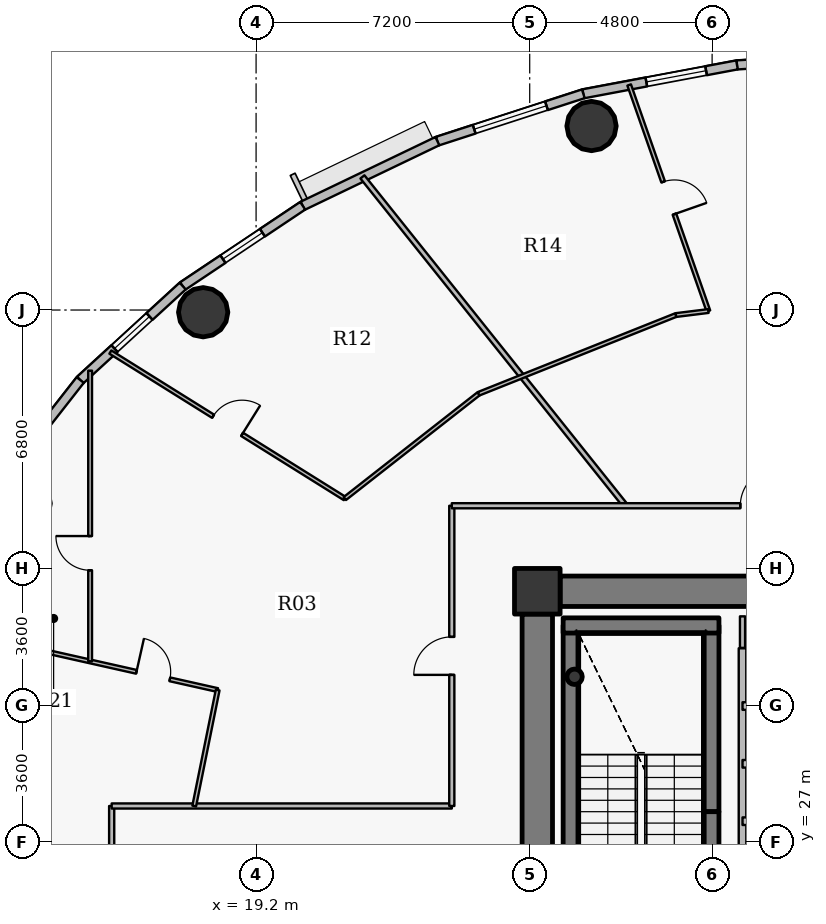
"""IFC4 building model, lengths in metres.
Left out: names, types, materials, properties, quantities, classifications, styles, units other than length and angle.
Written with IfcOpenShell. Run it as: python <this file> out.ifc"""

import sys

from ifc_helpers import new_model, si_unit, direction, frame, frame_2d, origin, origin_2d, place, context, subcontext, project, spatial, rectangle, hollow_circle, extrude, source, transform, mapped, element, fill, save


model = new_model("IFC4")
c1 = context("Model", 3, precision=1e-05, world=origin(), true_north=direction((0.0, 1.0)))
c2 = subcontext(c1, "Body", "Model", "MODEL_VIEW")
j1 = project(units=[si_unit("LENGTHUNIT", "METRE"), si_unit("PLANEANGLEUNIT", "RADIAN")], contexts=[c1])
p1 = place(None, origin())
s1 = spatial("IfcSite", under=j1, at=p1, CompositionType="ELEMENT")
p2 = place(p1, origin())
s2 = spatial("IfcBuilding", under=s1, at=p2, CompositionType="ELEMENT")
p3 = place(p2, frame((0.0, 0.0, 178.65)))
s3 = spatial("IfcBuildingStorey", under=s2, at=p3, CompositionType="ELEMENT", Elevation=178.65)
p4 = place(p3, frame((26.6, 33.6, 0.0), z_axis=(0.0, 0.0, 1.0), x_axis=(1.0, 0.0, 0.0)))
e1 = element("IfcColumn", 1, at=p4, inside=s3, PredefinedType="COLUMN", context=c2, shape_type="SweptSolid", body=[
    extrude(rectangle(XDim=1.2, YDim=1.2, at=origin_2d()), origin(), (0.0, 0.0, 1.0), 3.75),
])
p5 = place(p3, frame((27.48, 24.1, 0.0), z_axis=(0.0, 0.0, 1.0), x_axis=(0.0, 1.0, 0.0)))
e2 = element("IfcWall", 2, at=p5, inside=s3, PredefinedType="SHEAR", context=c2, shape_type="SweptSolid", body=[
    extrude(rectangle(XDim=8.6, YDim=0.4, at=frame_2d((4.3, 0.0))), origin(), (0.0, 0.0, 1.0), 3.75),
])
p6 = place(p3, frame((31.18, 27.8, 0.0), z_axis=(0.0, 0.0, 1.0), x_axis=(0.0, 1.0, 0.0)))
e3 = element("IfcWall", 3, at=p6, inside=s3, PredefinedType="SHEAR", context=c2, shape_type="SweptSolid", body=[
    extrude(rectangle(XDim=4.9, YDim=0.4, at=frame_2d((2.45, 0.0))), origin(), (0.0, 0.0, 1.0), 3.75),
])
p7 = place(p3, frame((27.28, 32.7, 0.0), z_axis=(0.0, 0.0, 1.0), x_axis=(1.0, 0.0, 0.0)))
e4 = element("IfcWall", 4, at=p7, inside=s3, PredefinedType="SHEAR", context=c2, shape_type="SweptSolid", body=[
    extrude(rectangle(XDim=4.1, YDim=0.4, at=frame_2d((2.05, 0.0))), origin(), (0.0, 0.0, 1.0), 3.75),
])
p8 = place(p3, frame((27.58, 31.35, 0.0), z_axis=(0.0, 0.0, 1.0), x_axis=(1.0, 0.0, 0.0)))
e5 = element("IfcColumn", 5, at=p8, inside=s3, PredefinedType="COLUMN", context=c2, shape_type="SweptSolid", body=[
    extrude(hollow_circle(Radius=0.203, WallThickness=0.016, at=origin_2d()), origin(), (0.0, 0.0, 1.0), 3.75),
])
p9 = place(p3, frame((27.2, 33.6, 0.0), z_axis=(0.0, 0.0, 1.0), x_axis=(1.0, 0.0, 0.0)))
e6 = element("IfcWall", 6, at=p9, inside=s3, PredefinedType="SHEAR", context=c2, shape_type="SweptSolid", body=[
    extrude(rectangle(XDim=17.6, YDim=0.8, at=frame_2d((8.8, 0.0))), origin(), (0.0, 0.0, 1.0), 2.95),
])
p10 = place(p9, frame((13.45, 0.0, 0.0)))
e7 = element("IfcOpeningElement", 7, at=p10, cuts=e6, PredefinedType="OPENING", context=c2, shape_type="SweptSolid", body=[
    extrude(rectangle(XDim=1.15, YDim=2.15, at=origin_2d()), frame((0.575, 0.41, 1.075), z_axis=(0.0, -1.0, 0.0), x_axis=(1.0, 0.0, 0.0)), (0.0, 0.0, 1.0), 0.82),
])
p11 = place(p3, frame((26.6, 21.0, 0.0), z_axis=(0.0, 0.0, 1.0), x_axis=(0.0, 1.0, 0.0)))
e8 = element("IfcWall", 8, at=p11, inside=s3, PredefinedType="SHEAR", context=c2, shape_type="SweptSolid", body=[
    extrude(rectangle(XDim=12.0, YDim=0.8, at=frame_2d((6.0, 0.0))), origin(), (0.0, 0.0, 1.0), 2.95),
])
p12 = place(p11, frame((1.061, 0.0, 0.0)))
e9 = element("IfcOpeningElement", 9, at=p12, cuts=e8, PredefinedType="OPENING", context=c2, shape_type="SweptSolid", body=[
    extrude(rectangle(XDim=1.15, YDim=2.15, at=origin_2d()), frame((0.575, 0.41, 1.075), z_axis=(0.0, -1.0, 0.0), x_axis=(1.0, 0.0, 0.0)), (0.0, 0.0, 1.0), 0.82),
])
p13 = place(p3, frame((31.18, 25.55, 0.0), z_axis=(0.0, 0.0, 1.0), x_axis=(0.0, 1.0, 0.0)))
e10 = element("IfcWall", 10, at=p13, inside=s3, PredefinedType="SHEAR", context=c2, shape_type="SweptSolid", body=[
    extrude(rectangle(XDim=2.25, YDim=0.4, at=frame_2d((1.125, 0.0))), origin(), (0.0, 0.0, 1.0), 3.1),
])
for number, where, z_axis, x_axis in (
    (11, (28.027, 45.841, 0.0), (0.0, 0.0, 1.0), (1.0, 0.0, 0.0)),
    (12, (17.808, 40.942, 0.0), (0.0, 0.0, 1.0), (1.0, 0.0, 0.0)),
):
    element("IfcColumn", number, at=place(p3, frame(where, z_axis=z_axis, x_axis=x_axis)), inside=s3, PredefinedType="COLUMN", context=c2, shape_type="SweptSolid", body=[
        extrude(hollow_circle(Radius=0.65, WallThickness=0.04, at=origin_2d()), origin(), (0.0, 0.0, 1.0), 3.75),
    ])
p14 = place(p3, frame((31.854, 47.449, 0.0), z_axis=(0.0, 0.0, 1.0), x_axis=(0.998104600619, 0.061540281305, 0.0)))
e13 = element("IfcWall", 13, at=p14, inside=s3, PredefinedType="SOLIDWALL", context=c2, shape_type="SweptSolid", body=[
    extrude(rectangle(XDim=4.154, YDim=0.24, at=frame_2d((2.077, 0.0))), origin(), (0.0, 0.0, 1.0), 3.5),
])
p15 = place(p14, frame((1.082, 0.0, 0.9)))
e14 = element("IfcOpeningElement", 14, at=p15, cuts=e13, PredefinedType="OPENING", context=c2, shape_type="SweptSolid", body=[
    extrude(rectangle(XDim=2.0, YDim=1.75, at=origin_2d()), frame((1.0, 0.13, 0.875), z_axis=(0.0, -1.0, 0.0), x_axis=(1.0, 0.0, 0.0)), (0.0, 0.0, 1.0), 0.26),
])
p16 = place(p3, frame((27.811, 46.689, 0.0), z_axis=(0.0, 0.0, 1.0), x_axis=(0.982788108205, 0.184736391573, 0.0)))
e15 = element("IfcWall", 15, at=p16, inside=s3, PredefinedType="SOLIDWALL", context=c2, shape_type="SweptSolid", body=[
    extrude(rectangle(XDim=4.114, YDim=0.24, at=frame_2d((2.057, 0.0))), origin(), (0.0, 0.0, 1.0), 3.5),
])
p17 = place(p16, frame((1.687, 0.0, 0.9)))
e16 = element("IfcOpeningElement", 16, at=p17, cuts=e15, PredefinedType="OPENING", context=c2, shape_type="SweptSolid", body=[
    extrude(rectangle(XDim=1.6, YDim=1.75, at=origin_2d()), frame((0.8, 0.13, 0.875), z_axis=(0.0, -1.0, 0.0), x_axis=(1.0, 0.0, 0.0)), (0.0, 0.0, 1.0), 0.26),
])
p18 = place(p3, frame((23.97, 45.444, 0.0), z_axis=(0.0, 0.0, 1.0), x_axis=(0.951209870236, 0.30854462038, 0.0)))
e17 = element("IfcWall", 17, at=p18, inside=s3, PredefinedType="SOLIDWALL", context=c2, shape_type="SweptSolid", body=[
    extrude(rectangle(XDim=4.038, YDim=0.24, at=frame_2d((2.019, 0.0))), origin(), (0.0, 0.0, 1.0), 3.5),
])
p19 = place(p18, frame((1.019, 0.0, 0.9)))
e18 = element("IfcOpeningElement", 18, at=p19, cuts=e17, PredefinedType="OPENING", context=c2, shape_type="SweptSolid", body=[
    extrude(rectangle(XDim=2.0, YDim=1.75, at=origin_2d()), frame((1.0, 0.13, 0.875), z_axis=(0.0, -1.0, 0.0), x_axis=(1.0, 0.0, 0.0)), (0.0, 0.0, 1.0), 0.26),
])
p20 = place(p3, frame((20.427, 43.743, 0.0), z_axis=(0.0, 0.0, 1.0), x_axis=(0.901564733809, 0.432644231155, 0.0)))
e19 = element("IfcWall", 19, at=p20, inside=s3, PredefinedType="SOLIDWALL", context=c2, shape_type="SweptSolid", body=[
    extrude(rectangle(XDim=3.93, YDim=0.24, at=frame_2d((1.965, 0.0))), origin(), (0.0, 0.0, 1.0), 3.5),
])
p21 = place(p3, frame((17.268, 41.631, 0.0), z_axis=(0.0, 0.0, 1.0), x_axis=(0.831228998277, 0.555930168657, 0.0)))
e20 = element("IfcWall", 20, at=p21, inside=s3, PredefinedType="SOLIDWALL", context=c2, shape_type="SweptSolid", body=[
    extrude(rectangle(XDim=3.8, YDim=0.24, at=frame_2d((1.9, 0.0))), origin(), (0.0, 0.0, 1.0), 3.5),
])
p22 = place(p21, frame((1.275, 0.0, 0.9)))
e21 = element("IfcOpeningElement", 21, at=p22, cuts=e20, PredefinedType="OPENING", context=c2, shape_type="SweptSolid", body=[
    extrude(rectangle(XDim=1.25, YDim=1.65, at=origin_2d()), frame((0.625, 0.13, 0.825), z_axis=(0.0, -1.0, 0.0), x_axis=(1.0, 0.0, 0.0)), (0.0, 0.0, 1.0), 0.26),
])
p23 = place(p3, frame((14.572, 39.158, 0.0), z_axis=(0.0, 0.0, 1.0), x_axis=(0.737076565834, 0.675809245349, 0.0)))
e22 = element("IfcWall", 22, at=p23, inside=s3, PredefinedType="SOLIDWALL", context=c2, shape_type="SweptSolid", body=[
    extrude(rectangle(XDim=3.658, YDim=0.24, at=frame_2d((1.829, 0.0))), origin(), (0.0, 0.0, 1.0), 3.5),
])
p24 = place(p23, frame((1.224, 0.0, 0.9)))
e23 = element("IfcOpeningElement", 23, at=p24, cuts=e22, PredefinedType="OPENING", context=c2, shape_type="SweptSolid", body=[
    extrude(rectangle(XDim=1.25, YDim=1.65, at=origin_2d()), frame((0.625, 0.13, 0.825), z_axis=(0.0, -1.0, 0.0), x_axis=(1.0, 0.0, 0.0)), (0.0, 0.0, 1.0), 0.26),
])
p25 = place(p3, frame((12.404, 36.388, 0.0), z_axis=(0.0, 0.0, 1.0), x_axis=(0.616287674549, 0.787521112224, 0.0)))
e24 = element("IfcWall", 24, at=p25, inside=s3, PredefinedType="SOLIDWALL", context=c2, shape_type="SweptSolid", body=[
    extrude(rectangle(XDim=3.517, YDim=0.24, at=frame_2d((1.759, 0.0))), origin(), (0.0, 0.0, 1.0), 3.5),
])
p26 = place(p3, frame((10.602, 32.704, 0.0), z_axis=(0.0, 0.0, 1.0), x_axis=(0.9756977614, -0.21912069368, 0.0)))
e25 = element("IfcWall", 25, at=p26, inside=s3, PredefinedType="PARTITIONING", context=c2, shape_type="SweptSolid", body=[
    extrude(rectangle(XDim=7.776, YDim=0.1, at=frame_2d((3.888, 0.0))), origin(), (0.0, 0.0, 1.0), 2.935),
])
p27 = place(p26, frame((5.586, 0.0, 0.0)))
e26 = element("IfcOpeningElement", 26, at=p27, cuts=e25, PredefinedType="OPENING", context=c2, shape_type="SweptSolid", body=[
    extrude(rectangle(XDim=0.9, YDim=2.1, at=origin_2d()), frame((0.45, 0.06, 1.05), z_axis=(0.0, -1.0, 0.0), x_axis=(1.0, 0.0, 0.0)), (0.0, 0.0, 1.0), 0.12),
])
p28 = place(p3, frame((14.833, 31.754, 0.0), z_axis=(0.0, 0.0, 1.0), x_axis=(0.0, 1.0, 0.0)))
e27 = element("IfcWall", 27, at=p28, inside=s3, PredefinedType="PARTITIONING", context=c2, shape_type="SweptSolid", body=[
    extrude(rectangle(XDim=7.651, YDim=0.1, at=frame_2d((3.825, 0.0))), origin(), (0.0, 0.0, 1.0), 2.935),
])
p29 = place(p28, frame((2.399, 0.0, 0.0)))
e28 = element("IfcOpeningElement", 28, at=p29, cuts=e27, PredefinedType="OPENING", context=c2, shape_type="SweptSolid", body=[
    extrude(rectangle(XDim=0.9, YDim=2.1, at=origin_2d()), frame((0.45, 0.06, 1.05), z_axis=(0.0, -1.0, 0.0), x_axis=(1.0, 0.0, 0.0)), (0.0, 0.0, 1.0), 0.12),
])
p30 = place(p3, frame((15.366, 39.894, 0.0), z_axis=(0.0, 0.0, 1.0), x_axis=(0.84804732756, -0.529920494242, 0.0)))
e29 = element("IfcWall", 29, at=p30, inside=s3, PredefinedType="PARTITIONING", context=c2, shape_type="SweptSolid", body=[
    extrude(rectangle(XDim=7.274, YDim=0.1, at=frame_2d((3.637, 0.0))), origin(), (0.0, 0.0, 1.0), 2.935),
])
p31 = place(p30, frame((3.187, 0.0, 0.0)))
e30 = element("IfcOpeningElement", 30, at=p31, cuts=e29, PredefinedType="OPENING", context=c2, shape_type="SweptSolid", body=[
    extrude(rectangle(XDim=0.9, YDim=2.1, at=origin_2d()), frame((0.45, 0.06, 1.05), z_axis=(0.0, -1.0, 0.0), x_axis=(1.0, 0.0, 0.0)), (0.0, 0.0, 1.0), 0.12),
])
p32 = place(p3, frame((15.4, 23.146, 0.0), z_axis=(0.0, 0.0, 1.0), x_axis=(0.0, 1.0, 0.0)))
e31 = element("IfcWall", 31, at=p32, inside=s3, PredefinedType="PARTITIONING", context=c2, shape_type="SweptSolid", body=[
    extrude(rectangle(XDim=4.804, YDim=0.135, at=frame_2d((2.402, 0.0))), origin(), (0.0, 0.0, 1.0), 2.935),
])
p33 = place(p3, frame((15.4, 27.95, 0.0), z_axis=(0.0, 0.0, 1.0), x_axis=(1.0, 0.0, 0.0)))
e32 = element("IfcWall", 32, at=p33, inside=s3, PredefinedType="PARTITIONING", context=c2, shape_type="SweptSolid", body=[
    extrude(rectangle(XDim=8.95, YDim=0.135, at=frame_2d((4.475, 0.0))), origin(), (0.0, 0.0, 1.0), 3.5),
])
p34 = place(p3, frame((17.572, 27.95, 0.0), z_axis=(0.0, 0.0, 1.0), x_axis=(0.19818274337, 0.980165088253, 0.0)))
e33 = element("IfcWall", 33, at=p34, inside=s3, PredefinedType="PARTITIONING", context=c2, shape_type="SweptSolid", body=[
    extrude(rectangle(XDim=3.112, YDim=0.1, at=frame_2d((1.556, 0.0))), origin(), (0.0, 0.0, 1.0), 3.5),
])
p35 = place(p3, frame((21.534, 36.039, 0.0), z_axis=(0.0, 0.0, 1.0), x_axis=(0.787313734036, 0.616552580238, 0.0)))
e34 = element("IfcWall", 34, at=p35, inside=s3, PredefinedType="PARTITIONING", context=c2, shape_type="SweptSolid", body=[
    extrude(rectangle(XDim=4.472, YDim=0.1, at=frame_2d((2.236, 0.0))), origin(), (0.0, 0.0, 1.0), 2.935),
])
p36 = place(p3, frame((21.999, 44.503, 0.0), z_axis=(0.0, 0.0, 1.0), x_axis=(0.624673551917, -0.780886005468, 0.0)))
e35 = element("IfcWall", 35, at=p36, inside=s3, PredefinedType="PARTITIONING", context=c2, shape_type="SweptSolid", body=[
    extrude(rectangle(XDim=11.081, YDim=0.135, at=frame_2d((5.541, 0.0))), origin(), (0.0, 0.0, 1.0), 2.935),
])
p37 = place(p3, frame((24.35, 27.95, 0.0), z_axis=(0.0, 0.0, 1.0), x_axis=(0.0, 1.0, 0.0)))
e36 = element("IfcWall", 36, at=p37, inside=s3, PredefinedType="PARTITIONING", context=c2, shape_type="SweptSolid", body=[
    extrude(rectangle(XDim=7.9, YDim=0.135, at=frame_2d((3.95, 0.0))), origin(), (0.0, 0.0, 1.0), 2.935),
])
p38 = place(p37, frame((3.45, 0.0, 0.0)))
e37 = element("IfcOpeningElement", 37, at=p38, cuts=e36, PredefinedType="OPENING", context=c2, shape_type="SweptSolid", body=[
    extrude(rectangle(XDim=1.0, YDim=2.15, at=origin_2d()), frame((0.5, 0.078, 1.075), z_axis=(0.0, -1.0, 0.0), x_axis=(1.0, 0.0, 0.0)), (0.0, 0.0, 1.0), 0.155),
])
p39 = place(p3, frame((24.35, 35.85, 0.0), z_axis=(0.0, 0.0, 1.0), x_axis=(1.0, 0.0, 0.0)))
e38 = element("IfcWall", 38, at=p39, inside=s3, PredefinedType="PARTITIONING", context=c2, shape_type="SweptSolid", body=[
    extrude(rectangle(XDim=11.654, YDim=0.135, at=frame_2d((5.827, 0.0))), origin(), (0.0, 0.0, 1.0), 2.935),
])
p40 = place(p39, frame((7.592, 0.0, 0.0)))
e39 = element("IfcOpeningElement", 39, at=p40, cuts=e38, PredefinedType="OPENING", context=c2, shape_type="SweptSolid", body=[
    extrude(rectangle(XDim=1.0, YDim=2.15, at=origin_2d()), frame((0.5, 0.078, 1.075), z_axis=(0.0, -1.0, 0.0), x_axis=(1.0, 0.0, 0.0)), (0.0, 0.0, 1.0), 0.155),
])
p41 = place(p3, frame((25.055, 38.796, 0.0), z_axis=(0.0, 0.0, 1.0), x_axis=(0.928798710424, 0.370584613166, 0.0)))
e40 = element("IfcWall", 40, at=p41, inside=s3, PredefinedType="PARTITIONING", context=c2, shape_type="SweptSolid", body=[
    extrude(rectangle(XDim=5.589, YDim=0.1, at=frame_2d((2.794, 0.0))), origin(), (0.0, 0.0, 1.0), 2.935),
])
p42 = place(p3, frame((29.018, 46.921, 0.0), z_axis=(0.0, 0.0, 1.0), x_axis=(0.330774858624, -0.943709697366, 0.0)))
e41 = element("IfcWall", 41, at=p42, inside=s3, PredefinedType="PARTITIONING", context=c2, shape_type="SweptSolid", body=[
    extrude(rectangle(XDim=6.302, YDim=0.1, at=frame_2d((3.151, 0.0))), origin(), (0.0, 0.0, 1.0), 2.935),
])
p43 = place(p42, frame((2.701, 0.0, 0.0)))
e42 = element("IfcOpeningElement", 42, at=p43, cuts=e41, PredefinedType="OPENING", context=c2, shape_type="SweptSolid", body=[
    extrude(rectangle(XDim=0.9, YDim=2.1, at=origin_2d()), frame((0.45, 0.06, 1.05), z_axis=(0.0, -1.0, 0.0), x_axis=(1.0, 0.0, 0.0)), (0.0, 0.0, 1.0), 0.12),
])
p44 = place(p3, frame((30.246, 40.867, 0.0), z_axis=(0.0, 0.0, 1.0), x_axis=(0.992394974801, 0.123094329637, 0.0)))
e43 = element("IfcWall", 43, at=p44, inside=s3, PredefinedType="PARTITIONING", context=c2, shape_type="SweptSolid", body=[
    extrude(rectangle(XDim=0.863, YDim=0.1, at=frame_2d((0.431, 0.0))), origin(), (0.0, 0.0, 1.0), 2.935),
])
p45 = place(p3, frame((32.0, 24.1, 0.0), z_axis=(0.0, 0.0, 1.0), x_axis=(0.0, 1.0, 0.0)))
e44 = element("IfcWall", 44, at=p45, inside=s3, PredefinedType="PARTITIONING", context=c2, shape_type="SweptSolid", body=[
    extrude(rectangle(XDim=8.0, YDim=0.2, at=frame_2d((4.0, 0.0))), origin(), (0.0, 0.0, 1.0), 3.5),
])
for number, where, z_axis, x_axis in (
    (45, (32.0, 27.55, 0.0), (0.0, 0.0, 1.0), (1.0, 0.0, 0.0)),
    (46, (32.0, 29.06, 0.0), (0.0, 0.0, 1.0), (1.0, 0.0, 0.0)),
    (47, (32.0, 30.58, 0.0), (0.0, 0.0, 1.0), (1.0, 0.0, 0.0)),
):
    element("IfcWall", number, at=place(p3, frame(where, z_axis=z_axis, x_axis=x_axis)), inside=s3, PredefinedType="PARTITIONING", context=c2, shape_type="SweptSolid", body=[
        extrude(rectangle(XDim=1.9, YDim=0.2, at=frame_2d((0.95, 0.0))), origin(), (0.0, 0.0, 1.0), 3.085),
    ])
p46 = place(p3, frame((32.0, 32.94, 0.0), z_axis=(0.0, 0.0, 1.0), x_axis=(0.0, -1.0, 0.0)))
e48 = element("IfcWall", 48, at=p46, inside=s3, PredefinedType="PARTITIONING", context=c2, shape_type="SweptSolid", body=[
    extrude(rectangle(XDim=0.83, YDim=0.135, at=frame_2d((0.415, 0.0))), origin(), (0.0, 0.0, 1.0), 3.035),
])
p47 = place(p3, frame((27.19, 34.0, 0.0), z_axis=(0.0, 0.0, 1.0), x_axis=(-1.0, 0.0, 0.0)))
e49 = element("IfcWall", 49, at=p47, inside=s3, PredefinedType="PARTITIONING", context=c2, shape_type="SweptSolid", body=[
    extrude(rectangle(XDim=0.99, YDim=0.135, at=frame_2d((0.495, 0.0))), origin(), (0.0, 0.0, 1.0), 2.935),
])
p48 = place(p3, frame((26.2, 33.692, 0.0), z_axis=(0.0, 0.0, 1.0), x_axis=(0.0, -1.0, 0.0)))
e50 = element("IfcWall", 50, at=p48, inside=s3, PredefinedType="PARTITIONING", context=c2, shape_type="SweptSolid", body=[
    extrude(rectangle(XDim=0.682, YDim=0.135, at=frame_2d((0.341, 0.0))), origin(), (0.0, 0.0, 1.0), 3.5),
])
m1 = source(origin(), c2, "Body", "SweptSolid", [
    extrude(rectangle(XDim=1.6, YDim=1.75, at=origin_2d()), frame((0.8, 0.03, 0.875), z_axis=(0.0, -1.0, 0.0), x_axis=(1.0, 0.0, 0.0)), (0.0, 0.0, 1.0), 0.06),
])
p49 = place(p17, origin())
e51 = element("IfcWindow", 51, at=p49, inside=s3, PartitioningType="DOUBLE_PANEL_VERTICAL", PredefinedType="WINDOW", context=c2, shape_type="MappedRepresentation", body=[
    mapped(m1, transform((0.0, 0.0, 0.0), x_axis=(1.0, 0.0, 0.0), y_axis=(0.0, 1.0, 0.0), z_axis=(0.0, 0.0, 1.0), scale=1.0)),
])
fill(e16, e51)
m2 = source(origin(), c2, "Body", "SweptSolid", [
    extrude(rectangle(XDim=2.0, YDim=1.75, at=origin_2d()), frame((1.0, 0.03, 0.875), z_axis=(0.0, -1.0, 0.0), x_axis=(1.0, 0.0, 0.0)), (0.0, 0.0, 1.0), 0.06),
])
p50 = place(p19, origin())
e52 = element("IfcWindow", 52, at=p50, inside=s3, PartitioningType="DOUBLE_PANEL_VERTICAL", PredefinedType="WINDOW", context=c2, shape_type="MappedRepresentation", body=[
    mapped(m2, transform((0.0, 0.0, 0.0), x_axis=(1.0, 0.0, 0.0), y_axis=(0.0, 1.0, 0.0), z_axis=(0.0, 0.0, 1.0), scale=1.0)),
])
fill(e18, e52)
m3 = source(origin(), c2, "Body", "SweptSolid", [
    extrude(rectangle(XDim=1.25, YDim=1.65, at=origin_2d()), frame((0.625, 0.03, 0.825), z_axis=(0.0, -1.0, 0.0), x_axis=(1.0, 0.0, 0.0)), (0.0, 0.0, 1.0), 0.06),
])
p51 = place(p24, origin())
e53 = element("IfcWindow", 53, at=p51, inside=s3, PartitioningType="SINGLE_PANEL", PredefinedType="WINDOW", context=c2, shape_type="MappedRepresentation", body=[
    mapped(m3, transform((0.0, 0.0, 0.0), x_axis=(1.0, 0.0, 0.0), y_axis=(0.0, 1.0, 0.0), z_axis=(0.0, 0.0, 1.0), scale=1.0)),
])
fill(e23, e53)
p52 = place(p22, origin())
e54 = element("IfcWindow", 54, at=p52, inside=s3, PartitioningType="SINGLE_PANEL", PredefinedType="WINDOW", context=c2, shape_type="MappedRepresentation", body=[
    mapped(m3, transform((0.0, 0.0, 0.0), x_axis=(1.0, 0.0, 0.0), y_axis=(0.0, 1.0, 0.0), z_axis=(0.0, 0.0, 1.0), scale=1.0)),
])
fill(e21, e54)
m4 = source(origin(), c2, "Body", "SweptSolid", [
    extrude(rectangle(XDim=1.0, YDim=2.15, at=origin_2d()), frame((0.5, 0.025, 1.075), z_axis=(0.0, -1.0, 0.0), x_axis=(1.0, 0.0, 0.0)), (0.0, 0.0, 1.0), 0.05),
])
p53 = place(p40, origin())
e55 = element("IfcDoor", 55, at=p53, inside=s3, OperationType="SINGLE_SWING_RIGHT", PredefinedType="DOOR", context=c2, shape_type="MappedRepresentation", body=[
    mapped(m4, transform((0.0, 0.0, 0.0), x_axis=(1.0, 0.0, 0.0), y_axis=(0.0, 1.0, 0.0), z_axis=(0.0, 0.0, 1.0), scale=1.0)),
])
fill(e39, e55)
m5 = source(origin(), c2, "Body", "SweptSolid", [
    extrude(rectangle(XDim=0.9, YDim=2.1, at=origin_2d()), frame((0.45, 0.025, 1.05), z_axis=(0.0, -1.0, 0.0), x_axis=(1.0, 0.0, 0.0)), (0.0, 0.0, 1.0), 0.05),
])
p54 = place(p43, origin())
e56 = element("IfcDoor", 56, at=p54, inside=s3, OperationType="SINGLE_SWING_RIGHT", PredefinedType="DOOR", context=c2, shape_type="MappedRepresentation", body=[
    mapped(m5, transform((0.0, 0.0, 0.0), x_axis=(1.0, 0.0, 0.0), y_axis=(0.0, 1.0, 0.0), z_axis=(0.0, 0.0, 1.0), scale=1.0)),
])
fill(e42, e56)
p55 = place(p38, origin())
e57 = element("IfcDoor", 57, at=p55, inside=s3, OperationType="SINGLE_SWING_LEFT", PredefinedType="DOOR", context=c2, shape_type="MappedRepresentation", body=[
    mapped(m4, transform((0.0, 0.0, 0.0), x_axis=(1.0, 0.0, 0.0), y_axis=(0.0, 1.0, 0.0), z_axis=(0.0, 0.0, 1.0), scale=1.0)),
])
fill(e37, e57)
p56 = place(p31, origin())
e58 = element("IfcDoor", 58, at=p56, inside=s3, OperationType="SINGLE_SWING_RIGHT", PredefinedType="DOOR", context=c2, shape_type="MappedRepresentation", body=[
    mapped(m5, transform((0.0, 0.0, 0.0), x_axis=(1.0, 0.0, 0.0), y_axis=(0.0, 1.0, 0.0), z_axis=(0.0, 0.0, 1.0), scale=1.0)),
])
fill(e30, e58)
p57 = place(p27, origin())
e59 = element("IfcDoor", 59, at=p57, inside=s3, OperationType="SINGLE_SWING_LEFT", PredefinedType="DOOR", context=c2, shape_type="MappedRepresentation", body=[
    mapped(m5, transform((0.0, 0.0, 0.0), x_axis=(1.0, 0.0, 0.0), y_axis=(0.0, 1.0, 0.0), z_axis=(0.0, 0.0, 1.0), scale=1.0)),
])
fill(e26, e59)
p58 = place(p29, origin())
e60 = element("IfcDoor", 60, at=p58, inside=s3, OperationType="SINGLE_SWING_RIGHT", PredefinedType="DOOR", context=c2, shape_type="MappedRepresentation", body=[
    mapped(m5, transform((0.0, 0.0, 0.0), x_axis=(1.0, 0.0, 0.0), y_axis=(0.0, 1.0, 0.0), z_axis=(0.0, 0.0, 1.0), scale=1.0)),
])
fill(e28, e60)
save(model, sys.argv[1])
